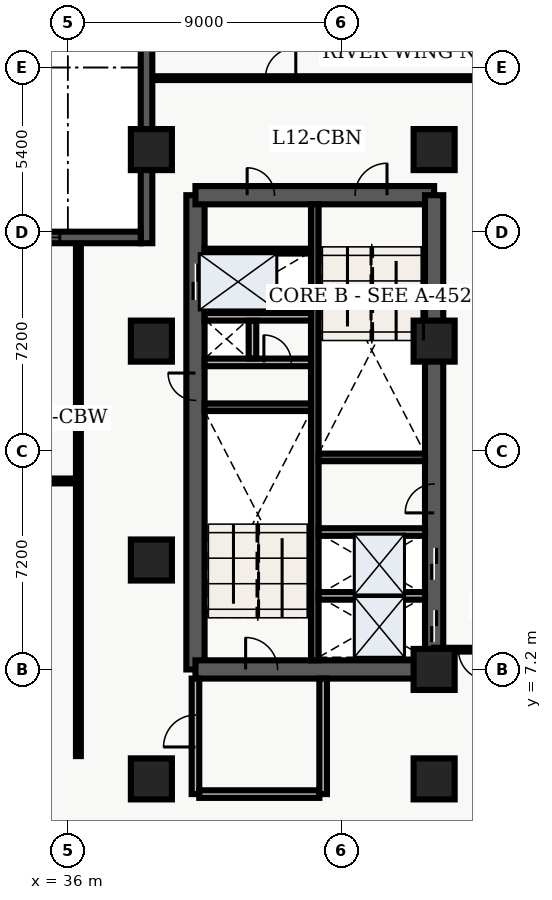
"""IFC4 building model, lengths in metres.
Left out: names, types, materials, properties, quantities, classifications, styles, units other than length and angle.
Written with IfcOpenShell. Run it as: python <this file> out.ifc"""

import sys

from ifc_helpers import new_model, entity, si_unit, converted_unit, direction, frame, origin_with_axes, origin_2d_with_axis, place, context, subcontext, project, spatial, polyline, rectangle, outline, extrude, element, fill, save


model = new_model("IFC4")
c1 = context("Model", 3, precision=1e-05, world=origin_with_axes(), true_north=direction((0.0, 1.0)))
c2 = subcontext(c1, "Body", "Model", "MODEL_VIEW")
j1 = project(units=[si_unit("LENGTHUNIT", "METRE"), converted_unit("PLANEANGLEUNIT", "DEGREE", entity("IfcPlaneAngleMeasure", 0.017), si_unit("PLANEANGLEUNIT", "RADIAN"), dimensions=[0, 0, 0, 0, 0, 0, 0])], contexts=[c1])
p1 = place(None, origin_with_axes())
s1 = spatial("IfcSite", under=j1, at=p1, CompositionType="ELEMENT")
p2 = place(p1, origin_with_axes())
s2 = spatial("IfcBuilding", under=s1, at=p2, CompositionType="ELEMENT")
p3 = place(p2, frame((0.0, 0.0, 52.2), z_axis=(0.0, 0.0, 1.0), x_axis=(1.0, 0.0, 0.0)))
s3 = spatial("IfcBuildingStorey", under=s2, at=p3, CompositionType="ELEMENT", Elevation=52.2)
p4 = place(p3, frame((40.2, 7.2, 0.0), z_axis=(0.0, 0.0, 1.0), x_axis=(0.0, 1.0, 0.0)))
e1 = element("IfcWall", 1, at=p4, inside=s3, PredefinedType="SHEAR", context=c2, shape_type="SweptSolid", body=[
    extrude(outline(polyline([(0.0, -0.3), (15.6, -0.3), (15.6, 0.3), (0.0, 0.3), (0.0, -0.3)])), origin_with_axes(), (0.0, 0.0, 1.0), 3.66),
])
p5 = place(p4, frame((12.75, 0.0, 0.0), z_axis=(0.0, 0.0, 1.0), x_axis=(1.0, 0.0, 0.0)))
e2 = element("IfcOpeningElement", 2, at=p5, cuts=e1, PredefinedType="OPENING", context=c2, shape_type="SweptSolid", body=[
    extrude(rectangle(XDim=1.2, YDim=0.62, at=origin_2d_with_axis()), origin_with_axes(), (0.0, 0.0, 1.0), 2.15),
])
p6 = place(p4, frame((9.3, 0.0, 0.0), z_axis=(0.0, 0.0, 1.0), x_axis=(1.0, 0.0, 0.0)))
e3 = element("IfcOpeningElement", 3, at=p6, cuts=e1, PredefinedType="OPENING", context=c2, shape_type="SweptSolid", body=[
    extrude(rectangle(XDim=0.9, YDim=0.62, at=origin_2d_with_axis()), origin_with_axes(), (0.0, 0.0, 1.0), 2.15),
])
p7 = place(p3, frame((40.2, 7.2, 0.0), z_axis=(0.0, 0.0, 1.0), x_axis=(1.0, 0.0, 0.0)))
e4 = element("IfcWall", 4, at=p7, inside=s3, PredefinedType="SHEAR", context=c2, shape_type="SweptSolid", body=[
    extrude(outline(polyline([(0.0, -0.3), (7.85, -0.3), (7.85, 0.3), (0.0, 0.3), (0.0, -0.3)])), origin_with_axes(), (0.0, 0.0, 1.0), 3.66),
])
p8 = place(p7, frame((2.175, 0.0, 0.0), z_axis=(0.0, 0.0, 1.0), x_axis=(1.0, 0.0, 0.0)))
e5 = element("IfcOpeningElement", 5, at=p8, cuts=e4, PredefinedType="OPENING", context=c2, shape_type="SweptSolid", body=[
    extrude(rectangle(XDim=1.05, YDim=0.62, at=origin_2d_with_axis()), origin_with_axes(), (0.0, 0.0, 1.0), 2.15),
])
p9 = place(p3, frame((40.2, 22.8, 0.0), z_axis=(0.0, 0.0, 1.0), x_axis=(1.0, 0.0, 0.0)))
e6 = element("IfcWall", 6, at=p9, inside=s3, PredefinedType="SHEAR", context=c2, shape_type="SweptSolid", body=[
    extrude(outline(polyline([(0.0, -0.3), (7.85, -0.3), (7.85, 0.3), (0.0, 0.3), (0.0, -0.3)])), origin_with_axes(), (0.0, 0.0, 1.0), 3.66),
])
p10 = place(p9, frame((5.775, 0.0, 0.0), z_axis=(0.0, 0.0, 1.0), x_axis=(1.0, 0.0, 0.0)))
e7 = element("IfcOpeningElement", 7, at=p10, cuts=e6, PredefinedType="OPENING", context=c2, shape_type="SweptSolid", body=[
    extrude(rectangle(XDim=1.05, YDim=0.62, at=origin_2d_with_axis()), origin_with_axes(), (0.0, 0.0, 1.0), 2.15),
])
p11 = place(p9, frame((2.15, 0.0, 0.0), z_axis=(0.0, 0.0, 1.0), x_axis=(1.0, 0.0, 0.0)))
e8 = element("IfcOpeningElement", 8, at=p11, cuts=e6, PredefinedType="OPENING", context=c2, shape_type="SweptSolid", body=[
    extrude(rectangle(XDim=0.9, YDim=0.62, at=origin_2d_with_axis()), origin_with_axes(), (0.0, 0.0, 1.0), 2.15),
])
p12 = place(p3, frame((48.05, 7.2, 0.0), z_axis=(0.0, 0.0, 1.0), x_axis=(0.0, 1.0, 0.0)))
e9 = element("IfcWall", 9, at=p12, inside=s3, PredefinedType="SHEAR", context=c2, shape_type="SweptSolid", body=[
    extrude(outline(polyline([(0.0, -0.3), (15.6, -0.3), (15.6, 0.3), (0.0, 0.3), (0.0, -0.3)])), origin_with_axes(), (0.0, 0.0, 1.0), 3.66),
])
p13 = place(p12, frame((1.425, 0.0, 0.0), z_axis=(0.0, 0.0, 1.0), x_axis=(1.0, 0.0, 0.0)))
e10 = element("IfcOpeningElement", 10, at=p13, cuts=e9, PredefinedType="OPENING", context=c2, shape_type="SweptSolid", body=[
    extrude(rectangle(XDim=1.05, YDim=0.62, at=origin_2d_with_axis()), origin_with_axes(), (0.0, 0.0, 1.0), 2.15),
])
p14 = place(p12, frame((3.475, 0.0, 0.0), z_axis=(0.0, 0.0, 1.0), x_axis=(1.0, 0.0, 0.0)))
e11 = element("IfcOpeningElement", 11, at=p14, cuts=e9, PredefinedType="OPENING", context=c2, shape_type="SweptSolid", body=[
    extrude(rectangle(XDim=1.05, YDim=0.62, at=origin_2d_with_axis()), origin_with_axes(), (0.0, 0.0, 1.0), 2.15),
])
p15 = place(p12, frame((5.625, 0.0, 0.0), z_axis=(0.0, 0.0, 1.0), x_axis=(1.0, 0.0, 0.0)))
e12 = element("IfcOpeningElement", 12, at=p15, cuts=e9, PredefinedType="OPENING", context=c2, shape_type="SweptSolid", body=[
    extrude(rectangle(XDim=0.95, YDim=0.62, at=origin_2d_with_axis()), origin_with_axes(), (0.0, 0.0, 1.0), 2.15),
])
p16 = place(p3, frame((44.125, 7.5, 0.0), z_axis=(0.0, 0.0, 1.0), x_axis=(0.0, 1.0, 0.0)))
e13 = element("IfcWall", 13, at=p16, inside=s3, PredefinedType="SHEAR", context=c2, shape_type="SweptSolid", body=[
    extrude(outline(polyline([(0.0, -0.125), (15.0, -0.125), (15.0, 0.125), (0.0, 0.125), (0.0, -0.125)])), origin_with_axes(), (0.0, 0.0, 1.0), 3.66),
])
for number, where, z_axis, x_axis in (
    (14, (40.5, 15.825, 0.0), (0.0, 0.0, 1.0), (1.0, 0.0, 0.0)),
    (15, (44.25, 14.175, 0.0), (0.0, 0.0, 1.0), (1.0, 0.0, 0.0)),
):
    element("IfcWall", number, at=place(p3, frame(where, z_axis=z_axis, x_axis=x_axis)), inside=s3, PredefinedType="SHEAR", context=c2, shape_type="SweptSolid", body=[
        extrude(outline(polyline([(0.0, -0.125), (3.5, -0.125), (3.5, 0.125), (0.0, 0.125), (0.0, -0.125)])), origin_with_axes(), (0.0, 0.0, 1.0), 3.66),
    ])
p17 = place(p3, frame((40.5, 17.3, 0.0), z_axis=(0.0, 0.0, 1.0), x_axis=(1.0, 0.0, 0.0)))
e16 = element("IfcWall", 16, at=p17, inside=s3, PredefinedType="SOLIDWALL", context=c2, shape_type="SweptSolid", body=[
    extrude(outline(polyline([(0.0, -0.125), (3.5, -0.125), (3.5, 0.125), (0.0, 0.125), (0.0, -0.125)])), origin_with_axes(), (0.0, 0.0, 1.0), 2.7),
])
p18 = place(p17, frame((2.4, 0.0, 0.0), z_axis=(0.0, 0.0, 1.0), x_axis=(1.0, 0.0, 0.0)))
e17 = element("IfcOpeningElement", 17, at=p18, cuts=e16, PredefinedType="OPENING", context=c2, shape_type="SweptSolid", body=[
    extrude(rectangle(XDim=0.9, YDim=0.27, at=origin_2d_with_axis()), origin_with_axes(), (0.0, 0.0, 1.0), 2.15),
])
p19 = place(p3, frame((40.5, 18.8, 0.0), z_axis=(0.0, 0.0, 1.0), x_axis=(1.0, 0.0, 0.0)))
e18 = element("IfcWall", 18, at=p19, inside=s3, PredefinedType="SOLIDWALL", context=c2, shape_type="SweptSolid", body=[
    extrude(outline(polyline([(0.0, -0.125), (3.5, -0.125), (3.5, 0.125), (0.0, 0.125), (0.0, -0.125)])), origin_with_axes(), (0.0, 0.0, 1.0), 2.7),
])
p20 = place(p3, frame((42.075, 17.43, 0.0), z_axis=(0.0, 0.0, 1.0), x_axis=(0.0, 1.0, 0.0)))
e19 = element("IfcWall", 19, at=p20, inside=s3, PredefinedType="SOLIDWALL", context=c2, shape_type="SweptSolid", body=[
    extrude(outline(polyline([(0.0, -0.125), (1.24, -0.125), (1.24, 0.125), (0.0, 0.125), (0.0, -0.125)])), origin_with_axes(), (0.0, 0.0, 1.0), 2.7),
])
p21 = place(p3, frame((40.2, 3.1, 0.0), z_axis=(0.0, 0.0, 1.0), x_axis=(0.0, 1.0, 0.0)))
e20 = element("IfcWall", 20, at=p21, inside=s3, PredefinedType="SOLIDWALL", context=c2, shape_type="SweptSolid", body=[
    extrude(outline(polyline([(0.0, -0.125), (3.8, -0.125), (3.8, 0.125), (0.0, 0.125), (0.0, -0.125)])), origin_with_axes(), (0.0, 0.0, 1.0), 2.7),
])
p22 = place(p21, frame((2.075, 0.0, 0.0), z_axis=(0.0, 0.0, 1.0), x_axis=(1.0, 0.0, 0.0)))
e21 = element("IfcOpeningElement", 21, at=p22, cuts=e20, PredefinedType="OPENING", context=c2, shape_type="SweptSolid", body=[
    extrude(rectangle(XDim=1.05, YDim=0.27, at=origin_2d_with_axis()), origin_with_axes(), (0.0, 0.0, 1.0), 2.15),
])
p23 = place(p3, frame((40.325, 3.1, 0.0), z_axis=(0.0, 0.0, 1.0), x_axis=(1.0, 0.0, 0.0)))
e22 = element("IfcWall", 22, at=p23, inside=s3, PredefinedType="SOLIDWALL", context=c2, shape_type="SweptSolid", body=[
    extrude(outline(polyline([(0.0, -0.125), (3.95, -0.125), (3.95, 0.125), (0.0, 0.125), (0.0, -0.125)])), origin_with_axes(), (0.0, 0.0, 1.0), 2.7),
])
p24 = place(p3, frame((44.4, 3.1, 0.0), z_axis=(0.0, 0.0, 1.0), x_axis=(0.0, 1.0, 0.0)))
e23 = element("IfcWall", 23, at=p24, inside=s3, PredefinedType="SOLIDWALL", context=c2, shape_type="SweptSolid", body=[
    extrude(outline(polyline([(0.0, -0.125), (3.8, -0.125), (3.8, 0.125), (0.0, 0.125), (0.0, -0.125)])), origin_with_axes(), (0.0, 0.0, 1.0), 2.7),
])
for number, where, z_axis, x_axis in (
    (24, (38.75, 3.6, 0.0), (0.0, 0.0, 1.0), (1.0, 0.0, 0.0)),
    (25, (38.75, 10.8, 0.0), (0.0, 0.0, 1.0), (1.0, 0.0, 0.0)),
    (26, (38.75, 18.0, 0.0), (0.0, 0.0, 1.0), (1.0, 0.0, 0.0)),
    (27, (38.75, 24.3, 0.0), (0.0, 0.0, 1.0), (1.0, 0.0, 0.0)),
    (28, (48.05, 3.6, 0.0), (0.0, 0.0, 1.0), (1.0, 0.0, 0.0)),
    (29, (48.05, 7.2, 0.0), (0.0, 0.0, 1.0), (1.0, 0.0, 0.0)),
    (30, (48.05, 18.0, 0.0), (0.0, 0.0, 1.0), (1.0, 0.0, 0.0)),
    (31, (48.05, 24.3, 0.0), (0.0, 0.0, 1.0), (1.0, 0.0, 0.0)),
):
    element("IfcColumn", number, at=place(p3, frame(where, z_axis=z_axis, x_axis=x_axis)), inside=s3, PredefinedType="COLUMN", context=c2, shape_type="SweptSolid", body=[
        extrude(rectangle(XDim=1.35, YDim=1.35, at=origin_2d_with_axis()), origin_with_axes(), (0.0, 0.0, 1.0), 3.9),
    ])
p25 = place(p3, frame((40.5, 20.96, 0.0), z_axis=(0.0, 0.0, 1.0), x_axis=(1.0, 0.0, 0.0)))
e32 = element("IfcWall", 32, at=p25, inside=s3, PredefinedType="PARTITIONING", context=c2, shape_type="SweptSolid", body=[
    extrude(outline(polyline([(0.0, -0.08), (3.5, -0.08), (3.5, 0.08), (0.0, 0.08), (0.0, -0.08)])), origin_with_axes(), (0.0, 0.0, 1.0), 2.7),
])
for number, where, z_axis, x_axis in (
    (33, (44.25, 9.62, 0.0), (0.0, 0.0, 1.0), (1.0, 0.0, 0.0)),
    (34, (44.25, 11.72, 0.0), (0.0, 0.0, 1.0), (1.0, 0.0, 0.0)),
):
    element("IfcWall", number, at=place(p3, frame(where, z_axis=z_axis, x_axis=x_axis)), inside=s3, PredefinedType="SOLIDWALL", context=c2, shape_type="SweptSolid", body=[
        extrude(outline(polyline([(0.0, -0.125), (3.5, -0.125), (3.5, 0.125), (0.0, 0.125), (0.0, -0.125)])), origin_with_axes(), (0.0, 0.0, 1.0), 2.7),
    ])
p26 = place(p3, frame((21.15, 13.4, 0.0), z_axis=(0.0, 0.0, 1.0), x_axis=(1.0, 0.0, 0.0)))
e35 = element("IfcWall", 35, at=p26, inside=s3, PredefinedType="PARTITIONING", context=c2, shape_type="SweptSolid", body=[
    extrude(outline(polyline([(0.0, -0.08), (15.2, -0.08), (15.2, 0.08), (0.0, 0.08), (0.0, -0.08)])), origin_with_axes(), (0.0, 0.0, 1.0), 2.7),
])
p27 = place(p26, frame((2.829, 0.0, 0.0), z_axis=(0.0, 0.0, 1.0), x_axis=(1.0, 0.0, 0.0)))
e36 = element("IfcOpeningElement", 36, at=p27, cuts=e35, PredefinedType="OPENING", context=c2, shape_type="SweptSolid", body=[
    extrude(rectangle(XDim=1.0, YDim=0.18, at=origin_2d_with_axis()), origin_with_axes(), (0.0, 0.0, 1.0), 2.15),
])
p28 = place(p26, frame((8.536, 0.0, 0.0), z_axis=(0.0, 0.0, 1.0), x_axis=(1.0, 0.0, 0.0)))
e37 = element("IfcOpeningElement", 37, at=p28, cuts=e35, PredefinedType="OPENING", context=c2, shape_type="SweptSolid", body=[
    extrude(rectangle(XDim=1.2, YDim=0.18, at=origin_2d_with_axis()), origin_with_axes(), (0.0, 0.0, 1.0), 2.2),
])
p29 = place(p26, frame((13.076, 0.0, 0.0), z_axis=(0.0, 0.0, 1.0), x_axis=(1.0, 0.0, 0.0)))
e38 = element("IfcOpeningElement", 38, at=p29, cuts=e35, PredefinedType="OPENING", context=c2, shape_type="SweptSolid", body=[
    extrude(rectangle(XDim=1.0, YDim=0.18, at=origin_2d_with_axis()), origin_with_axes(), (0.0, 0.0, 1.0), 2.15),
])
p30 = place(p3, frame((21.15, 15.7, 0.0), z_axis=(0.0, 0.0, 1.0), x_axis=(1.0, 0.0, 0.0)))
e39 = element("IfcWall", 39, at=p30, inside=s3, PredefinedType="PARTITIONING", context=c2, shape_type="SweptSolid", body=[
    extrude(outline(polyline([(0.0, -0.08), (15.2, -0.08), (15.2, 0.08), (0.0, 0.08), (0.0, -0.08)])), origin_with_axes(), (0.0, 0.0, 1.0), 2.7),
])
p31 = place(p30, frame((3.468, 0.0, 0.0), z_axis=(0.0, 0.0, 1.0), x_axis=(1.0, 0.0, 0.0)))
e40 = element("IfcOpeningElement", 40, at=p31, cuts=e39, PredefinedType="OPENING", context=c2, shape_type="SweptSolid", body=[
    extrude(rectangle(XDim=1.0, YDim=0.18, at=origin_2d_with_axis()), origin_with_axes(), (0.0, 0.0, 1.0), 2.15),
])
p32 = place(p30, frame((10.938, 0.0, 0.0), z_axis=(0.0, 0.0, 1.0), x_axis=(1.0, 0.0, 0.0)))
e41 = element("IfcOpeningElement", 41, at=p32, cuts=e39, PredefinedType="OPENING", context=c2, shape_type="SweptSolid", body=[
    extrude(rectangle(XDim=1.0, YDim=0.18, at=origin_2d_with_axis()), origin_with_axes(), (0.0, 0.0, 1.0), 2.15),
])
p33 = place(p3, frame((36.35, 4.35, 0.0), z_axis=(0.0, 0.0, 1.0), x_axis=(0.0, 1.0, 0.0)))
e42 = element("IfcWall", 42, at=p33, inside=s3, PredefinedType="PARTITIONING", context=c2, shape_type="SweptSolid", body=[
    extrude(outline(polyline([(0.0, -0.08), (16.95, -0.08), (16.95, 0.08), (0.0, 0.08), (0.0, -0.08)])), origin_with_axes(), (0.0, 0.0, 1.0), 2.7),
])
p34 = place(p3, frame((59.64, 7.85, 0.0), z_axis=(0.0, 0.0, 1.0), x_axis=(-1.0, 0.0, 0.0)))
e43 = element("IfcWall", 43, at=p34, inside=s3, PredefinedType="PARTITIONING", context=c2, shape_type="SweptSolid", body=[
    extrude(outline(polyline([(0.0, -0.062), (11.59, -0.062), (11.59, 0.062), (0.0, 0.062), (0.0, -0.062)])), origin_with_axes(), (0.0, 0.0, 1.0), 2.7),
])
p35 = place(p34, frame((10.29, 0.0, 0.0), z_axis=(0.0, 0.0, 1.0), x_axis=(1.0, 0.0, 0.0)))
e44 = element("IfcOpeningElement", 44, at=p35, cuts=e43, PredefinedType="OPENING", context=c2, shape_type="SweptSolid", body=[
    extrude(rectangle(XDim=1.0, YDim=0.145, at=origin_2d_with_axis()), origin_with_axes(), (0.0, 0.0, 1.0), 2.15),
])
p36 = place(p3, frame((38.76, 26.65, 0.0), z_axis=(0.0, 0.0, 1.0), x_axis=(1.0, 0.0, 0.0)))
e45 = element("IfcWall", 45, at=p36, inside=s3, PredefinedType="PARTITIONING", context=c2, shape_type="SweptSolid", body=[
    extrude(outline(polyline([(0.0, -0.062), (20.88, -0.062), (20.88, 0.062), (0.0, 0.062), (0.0, -0.062)])), origin_with_axes(), (0.0, 0.0, 1.0), 2.7),
])
p37 = place(p36, frame((4.24, 0.0, 0.0), z_axis=(0.0, 0.0, 1.0), x_axis=(1.0, 0.0, 0.0)))
e46 = element("IfcOpeningElement", 46, at=p37, cuts=e45, PredefinedType="OPENING", context=c2, shape_type="SweptSolid", body=[
    extrude(rectangle(XDim=1.0, YDim=0.145, at=origin_2d_with_axis()), origin_with_axes(), (0.0, 0.0, 1.0), 2.15),
])
p38 = place(p3, frame((38.59, 21.22, 0.0), z_axis=(0.0, 0.0, 1.0), x_axis=(0.0, 1.0, 0.0)))
e47 = element("IfcWall", 47, at=p38, inside=s3, PredefinedType="SOLIDWALL", context=c2, shape_type="SweptSolid", body=[
    extrude(outline(polyline([(0.0, -0.19), (7.58, -0.19), (7.58, 0.19), (0.0, 0.19), (0.0, -0.19)])), origin_with_axes(), (0.0, 0.0, 1.0), 3.66),
])
p39 = place(p3, frame((21.22, 21.41, 0.0), z_axis=(0.0, 0.0, 1.0), x_axis=(1.0, 0.0, 0.0)))
e48 = element("IfcWall", 48, at=p39, inside=s3, PredefinedType="SOLIDWALL", context=c2, shape_type="SweptSolid", body=[
    extrude(outline(polyline([(0.0, -0.19), (17.18, -0.19), (17.18, 0.19), (0.0, 0.19), (0.0, -0.19)])), origin_with_axes(), (0.0, 0.0, 1.0), 3.66),
])
p40 = place(p39, frame((3.263, 0.0, 0.45), z_axis=(0.0, 0.0, 1.0), x_axis=(1.0, 0.0, 0.0)))
e49 = element("IfcOpeningElement", 49, at=p40, cuts=e48, PredefinedType="OPENING", context=c2, shape_type="SweptSolid", body=[
    extrude(rectangle(XDim=2.1, YDim=0.4, at=origin_2d_with_axis()), origin_with_axes(), (0.0, 0.0, 1.0), 2.2),
])
p41 = place(p39, frame((8.59, 0.0, 0.45), z_axis=(0.0, 0.0, 1.0), x_axis=(1.0, 0.0, 0.0)))
e50 = element("IfcOpeningElement", 50, at=p41, cuts=e48, PredefinedType="OPENING", context=c2, shape_type="SweptSolid", body=[
    extrude(rectangle(XDim=2.1, YDim=0.4, at=origin_2d_with_axis()), origin_with_axes(), (0.0, 0.0, 1.0), 2.2),
])
p42 = place(p39, frame((13.467, 0.0, 0.45), z_axis=(0.0, 0.0, 1.0), x_axis=(1.0, 0.0, 0.0)))
e51 = element("IfcOpeningElement", 51, at=p42, cuts=e48, PredefinedType="OPENING", context=c2, shape_type="SweptSolid", body=[
    extrude(rectangle(XDim=2.1, YDim=0.4, at=origin_2d_with_axis()), origin_with_axes(), (0.0, 0.0, 1.0), 2.2),
])
p43 = place(p12, frame((1.425, 0.0, 0.0), z_axis=(0.0, 0.0, 1.0), x_axis=(1.0, 0.0, 0.0)))
e52 = element("IfcDoor", 52, at=p43, inside=s3, OperationType="SLIDING_TO_LEFT", PredefinedType="DOOR", context=c2, shape_type="SweptSolid", body=[
    extrude(rectangle(XDim=1.05, YDim=0.09, at=origin_2d_with_axis()), origin_with_axes(), (0.0, 0.0, 1.0), 2.15),
])
fill(e10, e52)
p44 = place(p12, frame((3.475, 0.0, 0.0), z_axis=(0.0, 0.0, 1.0), x_axis=(1.0, 0.0, 0.0)))
e53 = element("IfcDoor", 53, at=p44, inside=s3, OperationType="SLIDING_TO_RIGHT", PredefinedType="DOOR", context=c2, shape_type="SweptSolid", body=[
    extrude(rectangle(XDim=1.05, YDim=0.09, at=origin_2d_with_axis()), origin_with_axes(), (0.0, 0.0, 1.0), 2.15),
])
fill(e11, e53)
p45 = place(p4, frame((12.75, 0.0, 0.0), z_axis=(0.0, 0.0, 1.0), x_axis=(1.0, 0.0, 0.0)))
e54 = element("IfcDoor", 54, at=p45, inside=s3, OperationType="DOUBLE_DOOR_SLIDING", PredefinedType="DOOR", context=c2, shape_type="SweptSolid", body=[
    extrude(rectangle(XDim=1.2, YDim=0.09, at=origin_2d_with_axis()), origin_with_axes(), (0.0, 0.0, 1.0), 2.15),
])
fill(e2, e54)
p46 = place(p4, frame((9.3, 0.0, 0.0), z_axis=(0.0, 0.0, 1.0), x_axis=(1.0, 0.0, 0.0)))
e55 = element("IfcDoor", 55, at=p46, inside=s3, OperationType="SINGLE_SWING_RIGHT", PredefinedType="DOOR", context=c2, shape_type="SweptSolid", body=[
    extrude(rectangle(XDim=0.9, YDim=0.09, at=origin_2d_with_axis()), origin_with_axes(), (0.0, 0.0, 1.0), 2.15),
])
fill(e3, e55)
p47 = place(p17, frame((2.4, 0.0, 0.0), z_axis=(0.0, 0.0, 1.0), x_axis=(1.0, 0.0, 0.0)))
e56 = element("IfcDoor", 56, at=p47, inside=s3, OperationType="SINGLE_SWING_LEFT", PredefinedType="DOOR", context=c2, shape_type="SweptSolid", body=[
    extrude(rectangle(XDim=0.9, YDim=0.09, at=origin_2d_with_axis()), origin_with_axes(), (0.0, 0.0, 1.0), 2.15),
])
fill(e17, e56)
p48 = place(p7, frame((2.175, 0.0, 0.0), z_axis=(0.0, 0.0, 1.0), x_axis=(1.0, 0.0, 0.0)))
e57 = element("IfcDoor", 57, at=p48, inside=s3, OperationType="SINGLE_SWING_LEFT", PredefinedType="DOOR", context=c2, shape_type="SweptSolid", body=[
    extrude(rectangle(XDim=1.05, YDim=0.09, at=origin_2d_with_axis()), origin_with_axes(), (0.0, 0.0, 1.0), 2.15),
])
fill(e5, e57)
p49 = place(p9, frame((5.775, 0.0, 0.0), z_axis=(0.0, 0.0, 1.0), x_axis=(1.0, 0.0, 0.0)))
e58 = element("IfcDoor", 58, at=p49, inside=s3, OperationType="SINGLE_SWING_RIGHT", PredefinedType="DOOR", context=c2, shape_type="SweptSolid", body=[
    extrude(rectangle(XDim=1.05, YDim=0.09, at=origin_2d_with_axis()), origin_with_axes(), (0.0, 0.0, 1.0), 2.15),
])
fill(e7, e58)
p50 = place(p21, frame((2.075, 0.0, 0.0), z_axis=(0.0, 0.0, 1.0), x_axis=(1.0, 0.0, 0.0)))
e59 = element("IfcDoor", 59, at=p50, inside=s3, OperationType="SINGLE_SWING_LEFT", PredefinedType="DOOR", context=c2, shape_type="SweptSolid", body=[
    extrude(rectangle(XDim=1.05, YDim=0.09, at=origin_2d_with_axis()), origin_with_axes(), (0.0, 0.0, 1.0), 2.15),
])
fill(e21, e59)
p51 = place(p9, frame((2.15, 0.0, 0.0), z_axis=(0.0, 0.0, 1.0), x_axis=(1.0, 0.0, 0.0)))
e60 = element("IfcDoor", 60, at=p51, inside=s3, OperationType="SINGLE_SWING_LEFT", PredefinedType="DOOR", context=c2, shape_type="SweptSolid", body=[
    extrude(rectangle(XDim=0.9, YDim=0.09, at=origin_2d_with_axis()), origin_with_axes(), (0.0, 0.0, 1.0), 2.15),
])
fill(e8, e60)
p52 = place(p12, frame((5.625, 0.0, 0.0), z_axis=(0.0, 0.0, 1.0), x_axis=(1.0, 0.0, 0.0)))
e61 = element("IfcDoor", 61, at=p52, inside=s3, OperationType="SINGLE_SWING_LEFT", PredefinedType="DOOR", context=c2, shape_type="SweptSolid", body=[
    extrude(rectangle(XDim=0.95, YDim=0.09, at=origin_2d_with_axis()), origin_with_axes(), (0.0, 0.0, 1.0), 2.15),
])
fill(e12, e61)
p53 = place(p34, frame((10.29, 0.0, 0.0), z_axis=(0.0, 0.0, 1.0), x_axis=(1.0, 0.0, 0.0)))
e62 = element("IfcDoor", 62, at=p53, inside=s3, OperationType="SINGLE_SWING_LEFT", PredefinedType="DOOR", context=c2, shape_type="SweptSolid", body=[
    extrude(rectangle(XDim=1.0, YDim=0.075, at=origin_2d_with_axis()), origin_with_axes(), (0.0, 0.0, 1.0), 2.15),
])
fill(e44, e62)
p54 = place(p36, frame((4.24, 0.0, 0.0), z_axis=(0.0, 0.0, 1.0), x_axis=(1.0, 0.0, 0.0)))
e63 = element("IfcDoor", 63, at=p54, inside=s3, OperationType="SINGLE_SWING_RIGHT", PredefinedType="DOOR", context=c2, shape_type="SweptSolid", body=[
    extrude(rectangle(XDim=1.0, YDim=0.075, at=origin_2d_with_axis()), origin_with_axes(), (0.0, 0.0, 1.0), 2.15),
])
fill(e46, e63)
p55 = place(p39, frame((13.467, 0.0, 0.45), z_axis=(0.0, 0.0, 1.0), x_axis=(1.0, 0.0, 0.0)))
e64 = element("IfcWindow", 64, at=p55, inside=s3, PredefinedType="WINDOW", context=c2, shape_type="SweptSolid", body=[
    extrude(rectangle(XDim=2.1, YDim=0.09, at=origin_2d_with_axis()), origin_with_axes(), (0.0, 0.0, 1.0), 2.2),
])
fill(e51, e64)
save(model, sys.argv[1])
